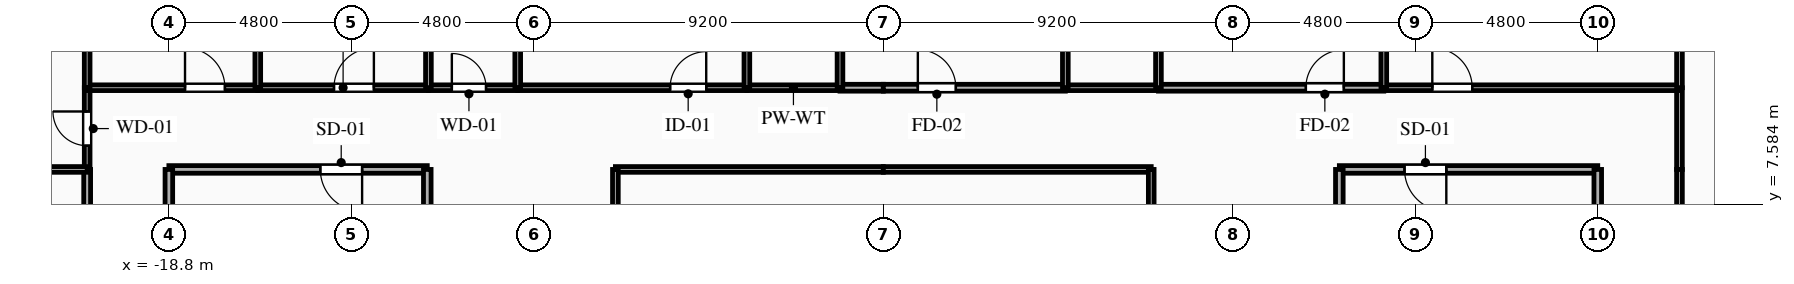
"""IFC4 building model, lengths in metres.
Left out: names, types, materials, properties, quantities, classifications, styles, units other than length and angle.
Written with IfcOpenShell. Run it as: python <this file> out.ifc"""

import sys

from ifc_helpers import new_model, si_unit, direction, frame, frame_2d, origin, place, context, subcontext, project, spatial, rectangle, extrude, element, fill, save


model = new_model("IFC4")
c1 = context("Model", 3, precision=1e-05, world=origin(), true_north=direction((0.0, 1.0)))
c2 = subcontext(c1, "Body", "Model", "MODEL_VIEW")
j1 = project(units=[si_unit("LENGTHUNIT", "METRE"), si_unit("PLANEANGLEUNIT", "RADIAN")], contexts=[c1])
p1 = place(None, origin())
s1 = spatial("IfcSite", under=j1, at=p1, CompositionType="ELEMENT")
p2 = place(p1, origin())
s2 = spatial("IfcBuilding", under=s1, at=p2, CompositionType="ELEMENT")
p3 = place(p2, frame((0.0, 0.0, 167.85)))
s3 = spatial("IfcBuildingStorey", under=s2, at=p3, CompositionType="ELEMENT", Elevation=167.85)
p4 = place(p3, frame((-12.0, 8.5, 0.0), z_axis=(0.0, 0.0, 1.0), x_axis=(-1.0, 0.0, 0.0)))
e1 = element("IfcWall", 1, at=p4, inside=s3, PredefinedType="PARTITIONING", context=c2, shape_type="SweptSolid", body=[
    extrude(rectangle(XDim=6.8, YDim=0.2, at=frame_2d((3.4, 0.0))), origin(), (0.0, 0.0, 1.0), 3.04),
])
p5 = place(p4, frame((1.715, 0.0, 0.0)))
e2 = element("IfcOpeningElement", 2, at=p5, cuts=e1, PredefinedType="OPENING", context=c2, shape_type="SweptSolid", body=[
    extrude(rectangle(XDim=1.1, YDim=2.15, at=frame_2d((0.55, 1.075))), frame((0.0, 0.11, 0.0), z_axis=(0.0, -1.0, 0.0), x_axis=(1.0, 0.0, 0.0)), (0.0, 0.0, 1.0), 0.22),
])
p6 = place(p3, frame((-18.8, 8.5, 0.0), z_axis=(0.0, 0.0, 1.0), x_axis=(0.0, -1.0, 0.0)))
e3 = element("IfcWall", 3, at=p6, inside=s3, PredefinedType="PARTITIONING", context=c2, shape_type="SweptSolid", body=[
    extrude(rectangle(XDim=2.9, YDim=0.2, at=frame_2d((1.45, 0.0))), origin(), (0.0, 0.0, 1.0), 2.525),
])
p7 = place(p3, frame((-12.0, 5.6, 0.0), z_axis=(0.0, 0.0, 1.0), x_axis=(0.0, 1.0, 0.0)))
e4 = element("IfcWall", 4, at=p7, inside=s3, PredefinedType="PARTITIONING", context=c2, shape_type="SweptSolid", body=[
    extrude(rectangle(XDim=2.9, YDim=0.2, at=frame_2d((1.45, 0.0))), origin(), (0.0, 0.0, 1.0), 3.04),
])
p8 = place(p3, frame((18.8, 8.5, 0.0), z_axis=(0.0, 0.0, 1.0), x_axis=(-1.0, 0.0, 0.0)))
e5 = element("IfcWall", 5, at=p8, inside=s3, PredefinedType="PARTITIONING", context=c2, shape_type="SweptSolid", body=[
    extrude(rectangle(XDim=6.8, YDim=0.2, at=frame_2d((3.4, 0.0))), origin(), (0.0, 0.0, 1.0), 3.04),
])
p9 = place(p8, frame((3.985, 0.0, 0.0)))
e6 = element("IfcOpeningElement", 6, at=p9, cuts=e5, PredefinedType="OPENING", context=c2, shape_type="SweptSolid", body=[
    extrude(rectangle(XDim=1.1, YDim=2.15, at=frame_2d((0.55, 1.075))), frame((0.0, 0.11, 0.0), z_axis=(0.0, -1.0, 0.0), x_axis=(1.0, 0.0, 0.0)), (0.0, 0.0, 1.0), 0.22),
])
p10 = place(p3, frame((18.8, 5.6, 0.0), z_axis=(0.0, 0.0, 1.0), x_axis=(0.0, 1.0, 0.0)))
e7 = element("IfcWall", 7, at=p10, inside=s3, PredefinedType="PARTITIONING", context=c2, shape_type="SweptSolid", body=[
    extrude(rectangle(XDim=2.9, YDim=0.2, at=frame_2d((1.45, 0.0))), origin(), (0.0, 0.0, 1.0), 2.525),
])
p11 = place(p3, frame((12.0, 8.5, 0.0), z_axis=(0.0, 0.0, 1.0), x_axis=(0.0, -1.0, 0.0)))
e8 = element("IfcWall", 8, at=p11, inside=s3, PredefinedType="PARTITIONING", context=c2, shape_type="SweptSolid", body=[
    extrude(rectangle(XDim=2.9, YDim=0.2, at=frame_2d((1.45, 0.0))), origin(), (0.0, 0.0, 1.0), 3.04),
])
p12 = place(p3, frame((-20.95, 8.5, 0.0), z_axis=(0.0, 0.0, 1.0), x_axis=(0.0, 1.0, 0.0)))
e9 = element("IfcWall", 9, at=p12, inside=s3, PredefinedType="PARTITIONING", context=c2, shape_type="SweptSolid", body=[
    extrude(rectangle(XDim=2.15, YDim=0.15, at=frame_2d((1.075, 0.0))), origin(), (0.0, 0.0, 1.0), 3.04),
])
p13 = place(p12, frame((0.625, 0.0, 0.0)))
e10 = element("IfcOpeningElement", 10, at=p13, cuts=e9, PredefinedType="OPENING", context=c2, shape_type="SweptSolid", body=[
    extrude(rectangle(XDim=0.9, YDim=2.1, at=frame_2d((0.45, 1.05))), frame((0.0, 0.085, 0.0), z_axis=(0.0, -1.0, 0.0), x_axis=(1.0, 0.0, 0.0)), (0.0, 0.0, 1.0), 0.17),
])
p14 = place(p3, frame((-20.95, 10.65, 0.0), z_axis=(0.0, 0.0, 1.0), x_axis=(1.0, 0.0, 0.0)))
e11 = element("IfcWall", 11, at=p14, inside=s3, PredefinedType="PARTITIONING", context=c2, shape_type="SweptSolid", body=[
    extrude(rectangle(XDim=4.49, YDim=0.15, at=frame_2d((2.245, 0.0))), origin(), (0.0, 0.0, 1.0), 3.04),
])
p15 = place(p14, frame((2.575, 0.0, 0.0)))
e12 = element("IfcOpeningElement", 12, at=p15, cuts=e11, PredefinedType="OPENING", context=c2, shape_type="SweptSolid", body=[
    extrude(rectangle(XDim=1.05, YDim=2.15, at=frame_2d((0.525, 1.075))), frame((0.0, 0.085, 0.0), z_axis=(0.0, -1.0, 0.0), x_axis=(1.0, 0.0, 0.0)), (0.0, 0.0, 1.0), 0.17),
])
p16 = place(p3, frame((-16.46, 10.65, 0.0), z_axis=(0.0, 0.0, 1.0), x_axis=(1.0, 0.0, 0.0)))
e13 = element("IfcWall", 13, at=p16, inside=s3, PredefinedType="PARTITIONING", context=c2, shape_type="SweptSolid", body=[
    extrude(rectangle(XDim=4.49, YDim=0.15, at=frame_2d((2.245, 0.0))), origin(), (0.0, 0.0, 1.0), 3.04),
])
p17 = place(p16, frame((2.005, 0.0, 0.0)))
e14 = element("IfcOpeningElement", 14, at=p17, cuts=e13, PredefinedType="OPENING", context=c2, shape_type="SweptSolid", body=[
    extrude(rectangle(XDim=1.05, YDim=2.15, at=frame_2d((0.525, 1.075))), frame((0.0, 0.085, 0.0), z_axis=(0.0, -1.0, 0.0), x_axis=(1.0, 0.0, 0.0)), (0.0, 0.0, 1.0), 0.17),
])
p18 = place(p3, frame((-11.97, 10.65, 0.0), z_axis=(0.0, 0.0, 1.0), x_axis=(1.0, 0.0, 0.0)))
e15 = element("IfcWall", 15, at=p18, inside=s3, PredefinedType="PLUMBINGWALL", context=c2, shape_type="SweptSolid", body=[
    extrude(rectangle(XDim=2.35, YDim=0.15, at=frame_2d((1.175, 0.0))), origin(), (0.0, 0.0, 1.0), 3.04),
])
p19 = place(p18, frame((0.616, 0.0, 0.0)))
e16 = element("IfcOpeningElement", 16, at=p19, cuts=e15, PredefinedType="OPENING", context=c2, shape_type="SweptSolid", body=[
    extrude(rectangle(XDim=0.9, YDim=2.1, at=frame_2d((0.45, 1.05))), frame((0.0, 0.085, 0.0), z_axis=(0.0, -1.0, 0.0), x_axis=(1.0, 0.0, 0.0)), (0.0, 0.0, 1.0), 0.17),
])
p20 = place(p3, frame((-9.62, 10.65, 0.0), z_axis=(0.0, 0.0, 1.0), x_axis=(1.0, 0.0, 0.0)))
e17 = element("IfcWall", 17, at=p20, inside=s3, PredefinedType="PARTITIONING", context=c2, shape_type="SweptSolid", body=[
    extrude(rectangle(XDim=6.03, YDim=0.15, at=frame_2d((3.015, 0.0))), origin(), (0.0, 0.0, 1.0), 3.04),
])
p21 = place(p20, frame((4.01, 0.0, 0.0)))
e18 = element("IfcOpeningElement", 18, at=p21, cuts=e17, PredefinedType="OPENING", context=c2, shape_type="SweptSolid", body=[
    extrude(rectangle(XDim=0.95, YDim=2.1, at=frame_2d((0.475, 1.05))), frame((0.0, 0.085, 0.0), z_axis=(0.0, -1.0, 0.0), x_axis=(1.0, 0.0, 0.0)), (0.0, 0.0, 1.0), 0.17),
])
p22 = place(p3, frame((-1.14, 10.65, 0.0), z_axis=(0.0, 0.0, 1.0), x_axis=(1.0, 0.0, 0.0)))
e19 = element("IfcWall", 19, at=p22, inside=s3, PredefinedType="PARTITIONING", context=c2, shape_type="SweptSolid", body=[
    extrude(rectangle(XDim=1.14, YDim=0.18, at=frame_2d((0.57, 0.0))), origin(), (0.0, 0.0, 1.0), 3.04),
])
p23 = place(p3, frame((-3.59, 10.65, 0.0), z_axis=(0.0, 0.0, 1.0), x_axis=(1.0, 0.0, 0.0)))
e20 = element("IfcWall", 20, at=p23, inside=s3, PredefinedType="PLUMBINGWALL", context=c2, shape_type="SweptSolid", body=[
    extrude(rectangle(XDim=2.45, YDim=0.15, at=frame_2d((1.225, 0.0))), origin(), (0.0, 0.0, 1.0), 3.04),
])
p24 = place(p3, frame((0.0, 8.5, 0.0), z_axis=(0.0, 0.0, 1.0), x_axis=(-1.0, 0.0, 0.0)))
e21 = element("IfcWall", 21, at=p24, inside=s3, PredefinedType="PARTITIONING", context=c2, shape_type="SweptSolid", body=[
    extrude(rectangle(XDim=7.05, YDim=0.15, at=frame_2d((3.525, 0.0))), origin(), (0.0, 0.0, 1.0), 3.04),
])
p25 = place(p3, frame((20.95, 10.65, 0.0), z_axis=(0.0, 0.0, 1.0), x_axis=(0.0, -1.0, 0.0)))
e22 = element("IfcWall", 22, at=p25, inside=s3, PredefinedType="PARTITIONING", context=c2, shape_type="SweptSolid", body=[
    extrude(rectangle(XDim=2.15, YDim=0.15, at=frame_2d((1.075, 0.0))), origin(), (0.0, 0.0, 1.0), 3.04),
])
p26 = place(p3, frame((0.0, 10.65, 0.0), z_axis=(0.0, 0.0, 1.0), x_axis=(1.0, 0.0, 0.0)))
e23 = element("IfcWall", 23, at=p26, inside=s3, PredefinedType="PARTITIONING", context=c2, shape_type="SweptSolid", body=[
    extrude(rectangle(XDim=4.79, YDim=0.18, at=frame_2d((2.395, 0.0))), origin(), (0.0, 0.0, 1.0), 3.04),
])
p27 = place(p26, frame((0.909, 0.0, 0.0)))
e24 = element("IfcOpeningElement", 24, at=p27, cuts=e23, PredefinedType="OPENING", context=c2, shape_type="SweptSolid", body=[
    extrude(rectangle(XDim=1.0, YDim=2.15, at=frame_2d((0.5, 1.075))), frame((0.0, 0.1, 0.0), z_axis=(0.0, -1.0, 0.0), x_axis=(1.0, 0.0, 0.0)), (0.0, 0.0, 1.0), 0.2),
])
p28 = place(p3, frame((7.24, 10.65, 0.0), z_axis=(0.0, 0.0, 1.0), x_axis=(1.0, 0.0, 0.0)))
e25 = element("IfcWall", 25, at=p28, inside=s3, PredefinedType="PARTITIONING", context=c2, shape_type="SweptSolid", body=[
    extrude(rectangle(XDim=5.93, YDim=0.18, at=frame_2d((2.965, 0.0))), origin(), (0.0, 0.0, 1.0), 3.04),
])
p29 = place(p28, frame((3.879, 0.0, 0.0)))
e26 = element("IfcOpeningElement", 26, at=p29, cuts=e25, PredefinedType="OPENING", context=c2, shape_type="SweptSolid", body=[
    extrude(rectangle(XDim=1.0, YDim=2.15, at=frame_2d((0.5, 1.075))), frame((0.0, 0.1, 0.0), z_axis=(0.0, -1.0, 0.0), x_axis=(1.0, 0.0, 0.0)), (0.0, 0.0, 1.0), 0.2),
])
p30 = place(p3, frame((4.79, 10.65, 0.0), z_axis=(0.0, 0.0, 1.0), x_axis=(1.0, 0.0, 0.0)))
e27 = element("IfcWall", 27, at=p30, inside=s3, PredefinedType="PLUMBINGWALL", context=c2, shape_type="SweptSolid", body=[
    extrude(rectangle(XDim=2.45, YDim=0.15, at=frame_2d((1.225, 0.0))), origin(), (0.0, 0.0, 1.0), 3.04),
])
p31 = place(p3, frame((13.17, 10.65, 0.0), z_axis=(0.0, 0.0, 1.0), x_axis=(1.0, 0.0, 0.0)))
e28 = element("IfcWall", 28, at=p31, inside=s3, PredefinedType="PARTITIONING", context=c2, shape_type="SweptSolid", body=[
    extrude(rectangle(XDim=7.78, YDim=0.15, at=frame_2d((3.89, 0.0))), origin(), (0.0, 0.0, 1.0), 3.04),
])
p32 = place(p31, frame((1.276, 0.0, 0.0)))
e29 = element("IfcOpeningElement", 29, at=p32, cuts=e28, PredefinedType="OPENING", context=c2, shape_type="SweptSolid", body=[
    extrude(rectangle(XDim=1.05, YDim=2.15, at=frame_2d((0.525, 1.075))), frame((0.0, 0.085, 0.0), z_axis=(0.0, -1.0, 0.0), x_axis=(1.0, 0.0, 0.0)), (0.0, 0.0, 1.0), 0.17),
])
p33 = place(p3, frame((7.05, 8.5, 0.0), z_axis=(0.0, 0.0, 1.0), x_axis=(-1.0, 0.0, 0.0)))
e30 = element("IfcWall", 30, at=p33, inside=s3, PredefinedType="PARTITIONING", context=c2, shape_type="SweptSolid", body=[
    extrude(rectangle(XDim=7.05, YDim=0.15, at=frame_2d((3.525, 0.0))), origin(), (0.0, 0.0, 1.0), 3.04),
])
p34 = place(p3, frame((-20.95, -5.6, 0.0), z_axis=(0.0, 0.0, 1.0), x_axis=(0.0, 1.0, 0.0)))
e31 = element("IfcWall", 31, at=p34, inside=s3, PredefinedType="PARTITIONING", context=c2, shape_type="SweptSolid", body=[
    extrude(rectangle(XDim=14.1, YDim=0.18, at=frame_2d((7.05, 0.0))), origin(), (0.0, 0.0, 1.0), 3.04),
])
p35 = place(p34, frame((5.058, 0.0, 0.0)))
e32 = element("IfcOpeningElement", 32, at=p35, cuts=e31, PredefinedType="OPENING", context=c2, shape_type="SweptSolid", body=[
    extrude(rectangle(XDim=1.0, YDim=2.15, at=frame_2d((0.5, 1.075))), frame((0.0, 0.1, 0.0), z_axis=(0.0, -1.0, 0.0), x_axis=(1.0, 0.0, 0.0)), (0.0, 0.0, 1.0), 0.2),
])
p36 = place(p3, frame((20.95, 8.5, 0.0), z_axis=(0.0, 0.0, 1.0), x_axis=(0.0, -1.0, 0.0)))
e33 = element("IfcWall", 33, at=p36, inside=s3, PredefinedType="PARTITIONING", context=c2, shape_type="SweptSolid", body=[
    extrude(rectangle(XDim=6.1, YDim=0.15, at=frame_2d((3.05, 0.0))), origin(), (0.0, 0.0, 1.0), 3.04),
])
p37 = place(p36, frame((3.984, 0.0, 0.0)))
e34 = element("IfcOpeningElement", 34, at=p37, cuts=e33, PredefinedType="OPENING", context=c2, shape_type="SweptSolid", body=[
    extrude(rectangle(XDim=1.05, YDim=2.15, at=frame_2d((0.525, 1.075))), frame((0.0, 0.085, 0.0), z_axis=(0.0, -1.0, 0.0), x_axis=(1.0, 0.0, 0.0)), (0.0, 0.0, 1.0), 0.17),
])
for number, where, z_axis, x_axis in (
    (35, (-7.05, 8.5, 0.0), (0.0, 0.0, 1.0), (0.0, -1.0, 0.0)),
    (36, (7.05, -0.8, 0.0), (0.0, 0.0, 1.0), (0.0, 1.0, 0.0)),
):
    element("IfcWall", number, at=place(p3, frame(where, z_axis=z_axis, x_axis=x_axis)), inside=s3, PredefinedType="PARTITIONING", context=c2, shape_type="SweptSolid", body=[
        extrude(rectangle(XDim=9.3, YDim=0.15, at=frame_2d((4.65, 0.0))), origin(), (0.0, 0.0, 1.0), 3.04),
    ])
p38 = place(p3, frame((-23.6, 8.5, 0.0), z_axis=(0.0, 0.0, 1.0), x_axis=(1.0, 0.0, 0.0)))
e37 = element("IfcWall", 37, at=p38, inside=s3, PredefinedType="PARTITIONING", context=c2, shape_type="SweptSolid", body=[
    extrude(rectangle(XDim=2.65, YDim=0.15, at=frame_2d((1.325, 0.0))), origin(), (0.0, 0.0, 1.0), 3.04),
])
p39 = place(p38, frame((0.635, 0.0, 0.0)))
e38 = element("IfcOpeningElement", 38, at=p39, cuts=e37, PredefinedType="OPENING", context=c2, shape_type="SweptSolid", body=[
    extrude(rectangle(XDim=1.05, YDim=2.15, at=frame_2d((0.525, 1.075))), frame((0.0, 0.085, 0.0), z_axis=(0.0, -1.0, 0.0), x_axis=(1.0, 0.0, 0.0)), (0.0, 0.0, 1.0), 0.17),
])
p40 = place(p3, frame((-20.95, 20.4, 0.0), z_axis=(0.0, 0.0, 1.0), x_axis=(0.0, -1.0, 0.0)))
e39 = element("IfcWall", 39, at=p40, inside=s3, PredefinedType="PARTITIONING", context=c2, shape_type="SweptSolid", body=[
    extrude(rectangle(XDim=9.75, YDim=0.15, at=frame_2d((4.875, 0.0))), origin(), (0.0, 0.0, 1.0), 3.04),
])
p41 = place(p3, frame((20.95, 10.65, 0.0), z_axis=(0.0, 0.0, 1.0), x_axis=(0.0, 1.0, 0.0)))
e40 = element("IfcWall", 40, at=p41, inside=s3, PredefinedType="PARTITIONING", context=c2, shape_type="SweptSolid", body=[
    extrude(rectangle(XDim=9.75, YDim=0.15, at=frame_2d((4.875, 0.0))), origin(), (0.0, 0.0, 1.0), 2.525),
])
p42 = place(p3, frame((-16.46, 20.4, 0.0), z_axis=(0.0, 0.0, 1.0), x_axis=(0.0, -1.0, 0.0)))
e41 = element("IfcWall", 41, at=p42, inside=s3, PredefinedType="PARTITIONING", context=c2, shape_type="SweptSolid", body=[
    extrude(rectangle(XDim=9.75, YDim=0.15, at=frame_2d((4.875, 0.0))), origin(), (0.0, 0.0, 1.0), 3.04),
])
for number, where, z_axis, x_axis in (
    (42, (-11.97, 20.4, 0.0), (0.0, 0.0, 1.0), (0.0, -1.0, 0.0)),
    (43, (-9.62, 20.4, 0.0), (0.0, 0.0, 1.0), (0.0, -1.0, 0.0)),
):
    element("IfcWall", number, at=place(p3, frame(where, z_axis=z_axis, x_axis=x_axis)), inside=s3, PredefinedType="PLUMBINGWALL", context=c2, shape_type="SweptSolid", body=[
        extrude(rectangle(XDim=9.75, YDim=0.15, at=frame_2d((4.875, 0.0))), origin(), (0.0, 0.0, 1.0), 3.04),
    ])
for number, where, z_axis, x_axis in (
    (44, (-3.59, 12.8, 0.0), (0.0, 0.0, 1.0), (0.0, -1.0, 0.0)),
    (45, (-1.14, 10.65, 0.0), (0.0, 0.0, 1.0), (0.0, 1.0, 0.0)),
    (46, (4.79, 12.8, 0.0), (0.0, 0.0, 1.0), (0.0, -1.0, 0.0)),
    (47, (7.24, 10.65, 0.0), (0.0, 0.0, 1.0), (0.0, 1.0, 0.0)),
):
    element("IfcWall", number, at=place(p3, frame(where, z_axis=z_axis, x_axis=x_axis)), inside=s3, PredefinedType="PLUMBINGWALL", context=c2, shape_type="SweptSolid", body=[
        extrude(rectangle(XDim=2.15, YDim=0.15, at=frame_2d((1.075, 0.0))), origin(), (0.0, 0.0, 1.0), 3.04),
    ])
p43 = place(p3, frame((13.17, 20.4, 0.0), z_axis=(0.0, 0.0, 1.0), x_axis=(0.0, -1.0, 0.0)))
e48 = element("IfcWall", 48, at=p43, inside=s3, PredefinedType="PARTITIONING", context=c2, shape_type="SweptSolid", body=[
    extrude(rectangle(XDim=9.75, YDim=0.15, at=frame_2d((4.875, 0.0))), origin(), (0.0, 0.0, 1.0), 3.04),
])
p44 = place(p5, origin())
e49 = element("IfcDoor", 49, at=p44, inside=s3, OperationType="SINGLE_SWING_LEFT", PredefinedType="DOOR", context=c2, shape_type="SweptSolid", body=[
    extrude(rectangle(XDim=1.1, YDim=2.15, at=frame_2d((0.55, 1.075))), frame((0.0, 0.025, 0.0), z_axis=(0.0, -1.0, 0.0), x_axis=(1.0, 0.0, 0.0)), (0.0, 0.0, 1.0), 0.05),
])
fill(e2, e49)
p45 = place(p9, origin())
e50 = element("IfcDoor", 50, at=p45, inside=s3, OperationType="SINGLE_SWING_LEFT", PredefinedType="DOOR", context=c2, shape_type="SweptSolid", body=[
    extrude(rectangle(XDim=1.1, YDim=2.15, at=frame_2d((0.55, 1.075))), frame((0.0, 0.025, 0.0), z_axis=(0.0, -1.0, 0.0), x_axis=(1.0, 0.0, 0.0)), (0.0, 0.0, 1.0), 0.05),
])
fill(e6, e50)
p46 = place(p13, origin())
e51 = element("IfcDoor", 51, at=p46, inside=s3, OperationType="SINGLE_SWING_RIGHT", PredefinedType="DOOR", context=c2, shape_type="SweptSolid", body=[
    extrude(rectangle(XDim=0.9, YDim=2.1, at=frame_2d((0.45, 1.05))), frame((0.0, 0.025, 0.0), z_axis=(0.0, -1.0, 0.0), x_axis=(1.0, 0.0, 0.0)), (0.0, 0.0, 1.0), 0.05),
])
fill(e10, e51)
p47 = place(p15, origin())
e52 = element("IfcDoor", 52, at=p47, inside=s3, OperationType="SINGLE_SWING_LEFT", PredefinedType="DOOR", context=c2, shape_type="SweptSolid", body=[
    extrude(rectangle(XDim=1.05, YDim=2.15, at=frame_2d((0.525, 1.075))), frame((0.0, 0.025, 0.0), z_axis=(0.0, -1.0, 0.0), x_axis=(1.0, 0.0, 0.0)), (0.0, 0.0, 1.0), 0.05),
])
fill(e12, e52)
p48 = place(p17, origin())
e53 = element("IfcDoor", 53, at=p48, inside=s3, OperationType="SINGLE_SWING_RIGHT", PredefinedType="DOOR", context=c2, shape_type="SweptSolid", body=[
    extrude(rectangle(XDim=1.05, YDim=2.15, at=frame_2d((0.525, 1.075))), frame((0.0, 0.025, 0.0), z_axis=(0.0, -1.0, 0.0), x_axis=(1.0, 0.0, 0.0)), (0.0, 0.0, 1.0), 0.05),
])
fill(e14, e53)
p49 = place(p19, origin())
e54 = element("IfcDoor", 54, at=p49, inside=s3, OperationType="SINGLE_SWING_LEFT", PredefinedType="DOOR", context=c2, shape_type="SweptSolid", body=[
    extrude(rectangle(XDim=0.9, YDim=2.1, at=frame_2d((0.45, 1.05))), frame((0.0, 0.025, 0.0), z_axis=(0.0, -1.0, 0.0), x_axis=(1.0, 0.0, 0.0)), (0.0, 0.0, 1.0), 0.05),
])
fill(e16, e54)
p50 = place(p21, origin())
e55 = element("IfcDoor", 55, at=p50, inside=s3, OperationType="SINGLE_SWING_RIGHT", PredefinedType="DOOR", context=c2, shape_type="SweptSolid", body=[
    extrude(rectangle(XDim=0.95, YDim=2.1, at=frame_2d((0.475, 1.05))), frame((0.0, 0.025, 0.0), z_axis=(0.0, -1.0, 0.0), x_axis=(1.0, 0.0, 0.0)), (0.0, 0.0, 1.0), 0.05),
])
fill(e18, e55)
p51 = place(p27, origin())
e56 = element("IfcDoor", 56, at=p51, inside=s3, OperationType="SINGLE_SWING_LEFT", PredefinedType="DOOR", context=c2, shape_type="SweptSolid", body=[
    extrude(rectangle(XDim=1.0, YDim=2.15, at=frame_2d((0.5, 1.075))), frame((0.0, 0.025, 0.0), z_axis=(0.0, -1.0, 0.0), x_axis=(1.0, 0.0, 0.0)), (0.0, 0.0, 1.0), 0.05),
])
fill(e24, e56)
p52 = place(p29, origin())
e57 = element("IfcDoor", 57, at=p52, inside=s3, OperationType="SINGLE_SWING_RIGHT", PredefinedType="DOOR", context=c2, shape_type="SweptSolid", body=[
    extrude(rectangle(XDim=1.0, YDim=2.15, at=frame_2d((0.5, 1.075))), frame((0.0, 0.025, 0.0), z_axis=(0.0, -1.0, 0.0), x_axis=(1.0, 0.0, 0.0)), (0.0, 0.0, 1.0), 0.05),
])
fill(e26, e57)
p53 = place(p32, origin())
e58 = element("IfcDoor", 58, at=p53, inside=s3, OperationType="SINGLE_SWING_LEFT", PredefinedType="DOOR", context=c2, shape_type="SweptSolid", body=[
    extrude(rectangle(XDim=1.05, YDim=2.15, at=frame_2d((0.525, 1.075))), frame((0.0, 0.025, 0.0), z_axis=(0.0, -1.0, 0.0), x_axis=(1.0, 0.0, 0.0)), (0.0, 0.0, 1.0), 0.05),
])
fill(e29, e58)
save(model, sys.argv[1])
